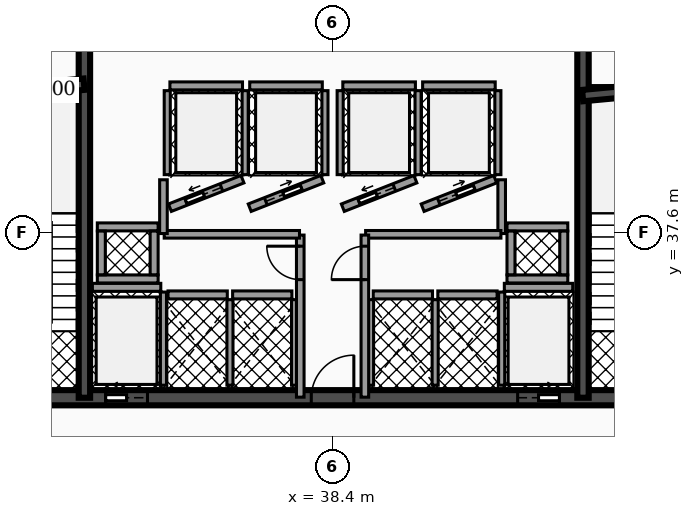
"""IFC4 building model, lengths in metres.
Left out: names, types, materials, properties, quantities, classifications, styles, units other than length and angle.
Written with IfcOpenShell. Run it as: python <this file> out.ifc"""

import sys

from ifc_helpers import new_model, si_unit, direction, frame, frame_2d, origin, place, context, subcontext, project, spatial, rectangle, extrude, element, fill, save


model = new_model("IFC4")
c1 = context("Model", 3, precision=1e-05, world=origin(), true_north=direction((0.0, 1.0)))
c2 = subcontext(c1, "Body", "Model", "MODEL_VIEW")
j1 = project(units=[si_unit("LENGTHUNIT", "METRE"), si_unit("PLANEANGLEUNIT", "RADIAN")], contexts=[c1])
p1 = place(None, origin())
s1 = spatial("IfcSite", under=j1, at=p1, CompositionType="ELEMENT")
p2 = place(p1, origin())
s2 = spatial("IfcBuilding", under=s1, at=p2, CompositionType="ELEMENT")
p3 = place(p2, frame((0.0, 0.0, 76.5)))
s3 = spatial("IfcBuildingStorey", under=s2, at=p3, CompositionType="ELEMENT", Elevation=76.5)
p4 = place(p3, frame((28.4, 33.25, 0.0), z_axis=(0.0, 0.0, 1.0), x_axis=(1.0, 0.0, 0.0)))
e1 = element("IfcWall", 1, at=p4, inside=s3, PredefinedType="SHEAR", context=c2, shape_type="SweptSolid", body=[
    extrude(rectangle(XDim=20.06, YDim=0.4, at=frame_2d((10.03, 0.0))), origin(), (0.0, 0.0, 1.0), 3.82),
])
p5 = place(p4, frame((4.03, 0.0, 0.0)))
e2 = element("IfcOpeningElement", 2, at=p5, cuts=e1, PredefinedType="OPENING", context=c2, shape_type="SweptSolid", body=[
    extrude(rectangle(XDim=1.1, YDim=2.15, at=frame_2d((0.55, 1.075))), frame((0.0, 0.21, 0.0), z_axis=(0.0, -1.0, 0.0), x_axis=(1.0, 0.0, 0.0)), (0.0, 0.0, 1.0), 0.42),
])
p6 = place(p4, frame((14.87, 0.0, 0.0)))
e3 = element("IfcOpeningElement", 3, at=p6, cuts=e1, PredefinedType="OPENING", context=c2, shape_type="SweptSolid", body=[
    extrude(rectangle(XDim=1.1, YDim=2.15, at=frame_2d((0.55, 1.075))), frame((0.0, 0.21, 0.0), z_axis=(0.0, -1.0, 0.0), x_axis=(1.0, 0.0, 0.0)), (0.0, 0.0, 1.0), 0.42),
])
p7 = place(p4, frame((1.31, 0.0, 0.0)))
e4 = element("IfcOpeningElement", 4, at=p7, cuts=e1, PredefinedType="OPENING", context=c2, shape_type="SweptSolid", body=[
    extrude(rectangle(XDim=1.1, YDim=2.2, at=frame_2d((0.55, 1.1))), frame((0.0, 0.21, 0.0), z_axis=(0.0, -1.0, 0.0), x_axis=(1.0, 0.0, 0.0)), (0.0, 0.0, 1.0), 0.42),
])
p8 = place(p4, frame((9.44, 0.0, 0.0)))
e5 = element("IfcOpeningElement", 5, at=p8, cuts=e1, PredefinedType="OPENING", context=c2, shape_type="SweptSolid", body=[
    extrude(rectangle(XDim=1.12, YDim=2.05, at=frame_2d((0.56, 1.025))), frame((0.0, 0.21, 0.0), z_axis=(0.0, -1.0, 0.0), x_axis=(1.0, 0.0, 0.0)), (0.0, 0.0, 1.0), 0.42),
])
p9 = place(p4, frame((17.65, 0.0, 0.0)))
e6 = element("IfcOpeningElement", 6, at=p9, cuts=e1, PredefinedType="OPENING", context=c2, shape_type="SweptSolid", body=[
    extrude(rectangle(XDim=1.1, YDim=2.2, at=frame_2d((0.55, 1.1))), frame((0.0, 0.21, 0.0), z_axis=(0.0, -1.0, 0.0), x_axis=(1.0, 0.0, 0.0)), (0.0, 0.0, 1.0), 0.42),
])
for number, where, z_axis, x_axis in (
    (7, (31.87, 33.25, 0.0), (0.0, 0.0, 1.0), (0.0, 1.0, 0.0)),
    (8, (44.99, 33.25, 0.0), (0.0, 0.0, 1.0), (0.0, 1.0, 0.0)),
):
    element("IfcWall", number, at=place(p3, frame(where, z_axis=z_axis, x_axis=x_axis)), inside=s3, PredefinedType="SHEAR", context=c2, shape_type="SweptSolid", body=[
        extrude(rectangle(XDim=10.2, YDim=0.3, at=frame_2d((5.1, 0.0))), origin(), (0.0, 0.0, 1.0), 3.82),
    ])
p10 = place(p3, frame((28.64, 41.2, 0.0), z_axis=(0.0, 0.0, 1.0), x_axis=(0.995687118776, 0.092774789157, 0.0)))
e9 = element("IfcWall", 9, at=p10, inside=s3, PredefinedType="SHEAR", context=c2, shape_type="SweptSolid", body=[
    extrude(rectangle(XDim=3.234, YDim=0.3, at=frame_2d((1.617, 0.0))), origin(), (0.0, 0.0, 1.0), 3.82),
])
p11 = place(p3, frame((44.98, 41.2, 0.0), z_axis=(0.0, 0.0, 1.0), x_axis=(0.995686468965, 0.09278176286, 0.0)))
e10 = element("IfcWall", 10, at=p11, inside=s3, PredefinedType="SHEAR", context=c2, shape_type="SweptSolid", body=[
    extrude(rectangle(XDim=3.234, YDim=0.3, at=frame_2d((1.617, 0.0))), origin(), (0.0, 0.0, 1.0), 3.82),
])
p12 = place(p3, frame((32.08, 36.155, 0.0), z_axis=(0.0, 0.0, 1.0), x_axis=(1.0, 0.0, 0.0)))
e11 = element("IfcWall", 11, at=p12, inside=s3, PredefinedType="SOLIDWALL", context=c2, shape_type="SweptSolid", body=[
    extrude(rectangle(XDim=1.8, YDim=0.21, at=frame_2d((0.9, 0.0))), origin(), (0.0, 0.0, 1.0), 2.792),
])
p13 = place(p3, frame((33.95, 33.58, 0.0), z_axis=(0.0, 0.0, 1.0), x_axis=(0.0, 1.0, 0.0)))
e12 = element("IfcWall", 12, at=p13, inside=s3, PredefinedType="SOLIDWALL", context=c2, shape_type="SweptSolid", body=[
    extrude(rectangle(XDim=2.45, YDim=0.16, at=frame_2d((1.225, 0.0))), origin(), (0.0, 0.0, 1.0), 2.792),
])
p14 = place(p3, frame((42.92, 36.155, 0.0), z_axis=(0.0, 0.0, 1.0), x_axis=(1.0, 0.0, 0.0)))
e13 = element("IfcWall", 13, at=p14, inside=s3, PredefinedType="SOLIDWALL", context=c2, shape_type="SweptSolid", body=[
    extrude(rectangle(XDim=1.8, YDim=0.21, at=frame_2d((0.9, 0.0))), origin(), (0.0, 0.0, 1.0), 2.792),
])
p15 = place(p3, frame((42.85, 33.58, 0.0), z_axis=(0.0, 0.0, 1.0), x_axis=(0.0, 1.0, 0.0)))
e14 = element("IfcWall", 14, at=p15, inside=s3, PredefinedType="SOLIDWALL", context=c2, shape_type="SweptSolid", body=[
    extrude(rectangle(XDim=2.45, YDim=0.16, at=frame_2d((1.225, 0.0))), origin(), (0.0, 0.0, 1.0), 2.792),
])
p16 = place(p3, frame((34.12, 38.25, 0.0), z_axis=(0.0, 0.0, 1.0), x_axis=(0.930804993012, 0.36551616241, 0.0)))
e15 = element("IfcWall", 15, at=p16, inside=s3, PredefinedType="SOLIDWALL", context=c2, shape_type="SweptSolid", body=[
    extrude(rectangle(XDim=2.052, YDim=0.21, at=frame_2d((1.026, 0.0))), origin(), (0.0, 0.0, 1.0), 2.792),
])
p17 = place(p16, frame((0.455, 0.0, 0.0)))
e16 = element("IfcOpeningElement", 16, at=p17, cuts=e15, PredefinedType="OPENING", context=c2, shape_type="SweptSolid", body=[
    extrude(rectangle(XDim=1.0, YDim=2.1, at=frame_2d((0.5, 1.05))), frame((0.0, 0.115, 0.0), z_axis=(0.0, -1.0, 0.0), x_axis=(1.0, 0.0, 0.0)), (0.0, 0.0, 1.0), 0.23),
])
p18 = place(p3, frame((34.12, 41.455, 0.0), z_axis=(0.0, 0.0, 1.0), x_axis=(1.0, 0.0, 0.0)))
e17 = element("IfcWall", 17, at=p18, inside=s3, PredefinedType="SOLIDWALL", context=c2, shape_type="SweptSolid", body=[
    extrude(rectangle(XDim=1.91, YDim=0.21, at=frame_2d((0.955, 0.0))), origin(), (0.0, 0.0, 1.0), 2.792),
])
for number, where, z_axis, x_axis in (
    (18, (34.05, 39.12, 0.0), (0.0, 0.0, 1.0), (0.0, 1.0, 0.0)),
    (19, (36.1, 39.12, 0.0), (0.0, 0.0, 1.0), (0.0, 1.0, 0.0)),
):
    element("IfcWall", number, at=place(p3, frame(where, z_axis=z_axis, x_axis=x_axis)), inside=s3, PredefinedType="SOLIDWALL", context=c2, shape_type="SweptSolid", body=[
        extrude(rectangle(XDim=2.21, YDim=0.16, at=frame_2d((1.105, 0.0))), origin(), (0.0, 0.0, 1.0), 2.792),
    ])
p19 = place(p3, frame((36.22, 38.25, 0.0), z_axis=(0.0, 0.0, 1.0), x_axis=(0.930804993012, 0.36551616241, 0.0)))
e20 = element("IfcWall", 20, at=p19, inside=s3, PredefinedType="SOLIDWALL", context=c2, shape_type="SweptSolid", body=[
    extrude(rectangle(XDim=2.052, YDim=0.21, at=frame_2d((1.026, 0.0))), origin(), (0.0, 0.0, 1.0), 2.792),
])
p20 = place(p19, frame((0.455, 0.0, 0.0)))
e21 = element("IfcOpeningElement", 21, at=p20, cuts=e20, PredefinedType="OPENING", context=c2, shape_type="SweptSolid", body=[
    extrude(rectangle(XDim=1.0, YDim=2.1, at=frame_2d((0.5, 1.05))), frame((0.0, 0.115, 0.0), z_axis=(0.0, -1.0, 0.0), x_axis=(1.0, 0.0, 0.0)), (0.0, 0.0, 1.0), 0.23),
])
p21 = place(p3, frame((36.22, 41.455, 0.0), z_axis=(0.0, 0.0, 1.0), x_axis=(1.0, 0.0, 0.0)))
e22 = element("IfcWall", 22, at=p21, inside=s3, PredefinedType="SOLIDWALL", context=c2, shape_type="SweptSolid", body=[
    extrude(rectangle(XDim=1.91, YDim=0.21, at=frame_2d((0.955, 0.0))), origin(), (0.0, 0.0, 1.0), 2.792),
])
p22 = place(p3, frame((38.2, 39.12, 0.0), z_axis=(0.0, 0.0, 1.0), x_axis=(0.0, 1.0, 0.0)))
e23 = element("IfcWall", 23, at=p22, inside=s3, PredefinedType="SOLIDWALL", context=c2, shape_type="SweptSolid", body=[
    extrude(rectangle(XDim=2.21, YDim=0.16, at=frame_2d((1.105, 0.0))), origin(), (0.0, 0.0, 1.0), 2.792),
])
p23 = place(p3, frame((38.67, 38.25, 0.0), z_axis=(0.0, 0.0, 1.0), x_axis=(0.930820886763, 0.3654756856, 0.0)))
e24 = element("IfcWall", 24, at=p23, inside=s3, PredefinedType="SOLIDWALL", context=c2, shape_type="SweptSolid", body=[
    extrude(rectangle(XDim=2.052, YDim=0.21, at=frame_2d((1.026, 0.0))), origin(), (0.0, 0.0, 1.0), 2.792),
])
p24 = place(p23, frame((0.455, 0.0, 0.0)))
e25 = element("IfcOpeningElement", 25, at=p24, cuts=e24, PredefinedType="OPENING", context=c2, shape_type="SweptSolid", body=[
    extrude(rectangle(XDim=1.0, YDim=2.1, at=frame_2d((0.5, 1.05))), frame((0.0, 0.115, 0.0), z_axis=(0.0, -1.0, 0.0), x_axis=(1.0, 0.0, 0.0)), (0.0, 0.0, 1.0), 0.23),
])
p25 = place(p3, frame((38.67, 41.455, 0.0), z_axis=(0.0, 0.0, 1.0), x_axis=(1.0, 0.0, 0.0)))
e26 = element("IfcWall", 26, at=p25, inside=s3, PredefinedType="SOLIDWALL", context=c2, shape_type="SweptSolid", body=[
    extrude(rectangle(XDim=1.91, YDim=0.21, at=frame_2d((0.955, 0.0))), origin(), (0.0, 0.0, 1.0), 2.792),
])
for number, where, z_axis, x_axis in (
    (27, (38.6, 39.12, 0.0), (0.0, 0.0, 1.0), (0.0, 1.0, 0.0)),
    (28, (40.65, 39.12, 0.0), (0.0, 0.0, 1.0), (0.0, 1.0, 0.0)),
):
    element("IfcWall", number, at=place(p3, frame(where, z_axis=z_axis, x_axis=x_axis)), inside=s3, PredefinedType="SOLIDWALL", context=c2, shape_type="SweptSolid", body=[
        extrude(rectangle(XDim=2.21, YDim=0.16, at=frame_2d((1.105, 0.0))), origin(), (0.0, 0.0, 1.0), 2.792),
    ])
p26 = place(p3, frame((40.77, 38.25, 0.0), z_axis=(0.0, 0.0, 1.0), x_axis=(0.930804993012, 0.36551616241, 0.0)))
e29 = element("IfcWall", 29, at=p26, inside=s3, PredefinedType="SOLIDWALL", context=c2, shape_type="SweptSolid", body=[
    extrude(rectangle(XDim=2.052, YDim=0.21, at=frame_2d((1.026, 0.0))), origin(), (0.0, 0.0, 1.0), 2.792),
])
p27 = place(p26, frame((0.455, 0.0, 0.0)))
e30 = element("IfcOpeningElement", 30, at=p27, cuts=e29, PredefinedType="OPENING", context=c2, shape_type="SweptSolid", body=[
    extrude(rectangle(XDim=1.0, YDim=2.1, at=frame_2d((0.5, 1.05))), frame((0.0, 0.115, 0.0), z_axis=(0.0, -1.0, 0.0), x_axis=(1.0, 0.0, 0.0)), (0.0, 0.0, 1.0), 0.23),
])
p28 = place(p3, frame((40.77, 41.455, 0.0), z_axis=(0.0, 0.0, 1.0), x_axis=(1.0, 0.0, 0.0)))
e31 = element("IfcWall", 31, at=p28, inside=s3, PredefinedType="SOLIDWALL", context=c2, shape_type="SweptSolid", body=[
    extrude(rectangle(XDim=1.91, YDim=0.21, at=frame_2d((0.955, 0.0))), origin(), (0.0, 0.0, 1.0), 2.792),
])
p29 = place(p3, frame((42.75, 39.12, 0.0), z_axis=(0.0, 0.0, 1.0), x_axis=(0.0, 1.0, 0.0)))
e32 = element("IfcWall", 32, at=p29, inside=s3, PredefinedType="SOLIDWALL", context=c2, shape_type="SweptSolid", body=[
    extrude(rectangle(XDim=2.21, YDim=0.16, at=frame_2d((1.105, 0.0))), origin(), (0.0, 0.0, 1.0), 2.792),
])
p30 = place(p3, frame((34.07, 35.955, 0.0), z_axis=(0.0, 0.0, 1.0), x_axis=(1.0, 0.0, 0.0)))
e33 = element("IfcWall", 33, at=p30, inside=s3, PredefinedType="SOLIDWALL", context=c2, shape_type="SweptSolid", body=[
    extrude(rectangle(XDim=1.56, YDim=0.21, at=frame_2d((0.78, 0.0))), origin(), (0.0, 0.0, 1.0), 2.792),
])
p31 = place(p3, frame((35.7, 33.58, 0.0), z_axis=(0.0, 0.0, 1.0), x_axis=(0.0, 1.0, 0.0)))
e34 = element("IfcWall", 34, at=p31, inside=s3, PredefinedType="SOLIDWALL", context=c2, shape_type="SweptSolid", body=[
    extrude(rectangle(XDim=2.25, YDim=0.16, at=frame_2d((1.125, 0.0))), origin(), (0.0, 0.0, 1.0), 2.792),
])
p32 = place(p3, frame((35.77, 35.955, 0.0), z_axis=(0.0, 0.0, 1.0), x_axis=(1.0, 0.0, 0.0)))
e35 = element("IfcWall", 35, at=p32, inside=s3, PredefinedType="SOLIDWALL", context=c2, shape_type="SweptSolid", body=[
    extrude(rectangle(XDim=1.56, YDim=0.21, at=frame_2d((0.78, 0.0))), origin(), (0.0, 0.0, 1.0), 2.792),
])
p33 = place(p3, frame((37.4, 33.58, 0.0), z_axis=(0.0, 0.0, 1.0), x_axis=(0.0, 1.0, 0.0)))
e36 = element("IfcWall", 36, at=p33, inside=s3, PredefinedType="SOLIDWALL", context=c2, shape_type="SweptSolid", body=[
    extrude(rectangle(XDim=2.25, YDim=0.16, at=frame_2d((1.125, 0.0))), origin(), (0.0, 0.0, 1.0), 2.792),
])
p34 = place(p3, frame((39.47, 35.955, 0.0), z_axis=(0.0, 0.0, 1.0), x_axis=(1.0, 0.0, 0.0)))
e37 = element("IfcWall", 37, at=p34, inside=s3, PredefinedType="SOLIDWALL", context=c2, shape_type="SweptSolid", body=[
    extrude(rectangle(XDim=1.56, YDim=0.21, at=frame_2d((0.78, 0.0))), origin(), (0.0, 0.0, 1.0), 2.792),
])
for number, where, z_axis, x_axis in (
    (38, (39.4, 33.58, 0.0), (0.0, 0.0, 1.0), (0.0, 1.0, 0.0)),
    (39, (41.1, 33.58, 0.0), (0.0, 0.0, 1.0), (0.0, 1.0, 0.0)),
):
    element("IfcWall", number, at=place(p3, frame(where, z_axis=z_axis, x_axis=x_axis)), inside=s3, PredefinedType="SOLIDWALL", context=c2, shape_type="SweptSolid", body=[
        extrude(rectangle(XDim=2.25, YDim=0.16, at=frame_2d((1.125, 0.0))), origin(), (0.0, 0.0, 1.0), 2.792),
    ])
p35 = place(p3, frame((41.17, 35.955, 0.0), z_axis=(0.0, 0.0, 1.0), x_axis=(1.0, 0.0, 0.0)))
e40 = element("IfcWall", 40, at=p35, inside=s3, PredefinedType="SOLIDWALL", context=c2, shape_type="SweptSolid", body=[
    extrude(rectangle(XDim=1.56, YDim=0.21, at=frame_2d((0.78, 0.0))), origin(), (0.0, 0.0, 1.0), 2.792),
])
for number, where, z_axis, x_axis in (
    (41, (32.21, 36.375, 0.0), (0.0, 0.0, 1.0), (1.0, 0.0, 0.0)),
    (42, (32.21, 37.745, 0.0), (0.0, 0.0, 1.0), (1.0, 0.0, 0.0)),
):
    element("IfcWall", number, at=place(p3, frame(where, z_axis=z_axis, x_axis=x_axis)), inside=s3, PredefinedType="SOLIDWALL", context=c2, shape_type="SweptSolid", body=[
        extrude(rectangle(XDim=1.6, YDim=0.21, at=frame_2d((0.8, 0.0))), origin(), (0.0, 0.0, 1.0), 3.82),
    ])
for number, where, z_axis, x_axis in (
    (43, (32.315, 36.485, 0.0), (0.0, 0.0, 1.0), (0.0, 1.0, 0.0)),
    (44, (33.705, 36.485, 0.0), (0.0, 0.0, 1.0), (0.0, 1.0, 0.0)),
):
    element("IfcWall", number, at=place(p3, frame(where, z_axis=z_axis, x_axis=x_axis)), inside=s3, PredefinedType="SOLIDWALL", context=c2, shape_type="SweptSolid", body=[
        extrude(rectangle(XDim=1.15, YDim=0.21, at=frame_2d((0.575, 0.0))), origin(), (0.0, 0.0, 1.0), 3.82),
    ])
for number, where, z_axis, x_axis in (
    (45, (42.99, 36.375, 0.0), (0.0, 0.0, 1.0), (1.0, 0.0, 0.0)),
    (46, (42.99, 37.745, 0.0), (0.0, 0.0, 1.0), (1.0, 0.0, 0.0)),
):
    element("IfcWall", number, at=place(p3, frame(where, z_axis=z_axis, x_axis=x_axis)), inside=s3, PredefinedType="SOLIDWALL", context=c2, shape_type="SweptSolid", body=[
        extrude(rectangle(XDim=1.6, YDim=0.21, at=frame_2d((0.8, 0.0))), origin(), (0.0, 0.0, 1.0), 3.82),
    ])
for number, where, z_axis, x_axis in (
    (47, (43.095, 36.485, 0.0), (0.0, 0.0, 1.0), (0.0, 1.0, 0.0)),
    (48, (44.485, 36.485, 0.0), (0.0, 0.0, 1.0), (0.0, 1.0, 0.0)),
):
    element("IfcWall", number, at=place(p3, frame(where, z_axis=z_axis, x_axis=x_axis)), inside=s3, PredefinedType="SOLIDWALL", context=c2, shape_type="SweptSolid", body=[
        extrude(rectangle(XDim=1.15, YDim=0.21, at=frame_2d((0.575, 0.0))), origin(), (0.0, 0.0, 1.0), 3.82),
    ])
p36 = place(p3, frame((37.55, 33.265, 0.0), z_axis=(0.0, 0.0, 1.0), x_axis=(0.0, 1.0, 0.0)))
e49 = element("IfcWall", 49, at=p36, inside=s3, PredefinedType="PARTITIONING", context=c2, shape_type="SweptSolid", body=[
    extrude(rectangle(XDim=4.265, YDim=0.2, at=frame_2d((2.133, 0.0))), origin(), (0.0, 0.0, 1.0), 2.777),
])
p37 = place(p36, frame((3.093, 0.0, 0.0)))
e50 = element("IfcOpeningElement", 50, at=p37, cuts=e49, PredefinedType="OPENING", context=c2, shape_type="SweptSolid", body=[
    extrude(rectangle(XDim=0.88, YDim=2.05, at=frame_2d((0.44, 1.025))), frame((0.0, 0.11, 0.0), z_axis=(0.0, -1.0, 0.0), x_axis=(1.0, 0.0, 0.0)), (0.0, 0.0, 1.0), 0.22),
])
p38 = place(p3, frame((33.97, 37.55, 0.0), z_axis=(0.0, 0.0, 1.0), x_axis=(1.0, 0.0, 0.0)))
e51 = element("IfcWall", 51, at=p38, inside=s3, PredefinedType="PARTITIONING", context=c2, shape_type="SweptSolid", body=[
    extrude(rectangle(XDim=3.56, YDim=0.2, at=frame_2d((1.78, 0.0))), origin(), (0.0, 0.0, 1.0), 2.777),
])
for number, where, z_axis, x_axis in (
    (52, (33.95, 37.57, 0.0), (0.0, 0.0, 1.0), (0.0, 1.0, 0.0)),
    (53, (42.85, 37.57, 0.0), (0.0, 0.0, 1.0), (0.0, 1.0, 0.0)),
):
    element("IfcWall", number, at=place(p3, frame(where, z_axis=z_axis, x_axis=x_axis)), inside=s3, PredefinedType="PARTITIONING", context=c2, shape_type="SweptSolid", body=[
        extrude(rectangle(XDim=1.415, YDim=0.2, at=frame_2d((0.708, 0.0))), origin(), (0.0, 0.0, 1.0), 2.777),
    ])
p39 = place(p3, frame((39.27, 37.55, 0.0), z_axis=(0.0, 0.0, 1.0), x_axis=(1.0, 0.0, 0.0)))
e54 = element("IfcWall", 54, at=p39, inside=s3, PredefinedType="PARTITIONING", context=c2, shape_type="SweptSolid", body=[
    extrude(rectangle(XDim=3.56, YDim=0.2, at=frame_2d((1.78, 0.0))), origin(), (0.0, 0.0, 1.0), 2.777),
])
p40 = place(p3, frame((39.25, 33.265, 0.0), z_axis=(0.0, 0.0, 1.0), x_axis=(0.0, 1.0, 0.0)))
e55 = element("IfcWall", 55, at=p40, inside=s3, PredefinedType="PARTITIONING", context=c2, shape_type="SweptSolid", body=[
    extrude(rectangle(XDim=4.265, YDim=0.2, at=frame_2d((2.133, 0.0))), origin(), (0.0, 0.0, 1.0), 2.777),
])
p41 = place(p40, frame((3.093, 0.0, 0.0)))
e56 = element("IfcOpeningElement", 56, at=p41, cuts=e55, PredefinedType="OPENING", context=c2, shape_type="SweptSolid", body=[
    extrude(rectangle(XDim=0.88, YDim=2.05, at=frame_2d((0.44, 1.025))), frame((0.0, 0.11, 0.0), z_axis=(0.0, -1.0, 0.0), x_axis=(1.0, 0.0, 0.0)), (0.0, 0.0, 1.0), 0.22),
])
p42 = place(p5, origin())
e57 = element("IfcDoor", 57, at=p42, inside=s3, OperationType="SLIDING_TO_LEFT", PredefinedType="DOOR", context=c2, shape_type="SweptSolid", body=[
    extrude(rectangle(XDim=1.1, YDim=2.15, at=frame_2d((0.55, 1.075))), frame((0.0, 0.025, 0.0), z_axis=(0.0, -1.0, 0.0), x_axis=(1.0, 0.0, 0.0)), (0.0, 0.0, 1.0), 0.05),
])
fill(e2, e57)
p43 = place(p6, origin())
e58 = element("IfcDoor", 58, at=p43, inside=s3, OperationType="SLIDING_TO_RIGHT", PredefinedType="DOOR", context=c2, shape_type="SweptSolid", body=[
    extrude(rectangle(XDim=1.1, YDim=2.15, at=frame_2d((0.55, 1.075))), frame((0.0, 0.025, 0.0), z_axis=(0.0, -1.0, 0.0), x_axis=(1.0, 0.0, 0.0)), (0.0, 0.0, 1.0), 0.05),
])
fill(e3, e58)
p44 = place(p17, origin())
e59 = element("IfcDoor", 59, at=p44, inside=s3, OperationType="SLIDING_TO_LEFT", PredefinedType="DOOR", context=c2, shape_type="SweptSolid", body=[
    extrude(rectangle(XDim=1.0, YDim=2.1, at=frame_2d((0.5, 1.05))), frame((0.0, 0.025, 0.0), z_axis=(0.0, -1.0, 0.0), x_axis=(1.0, 0.0, 0.0)), (0.0, 0.0, 1.0), 0.05),
])
fill(e16, e59)
p45 = place(p20, origin())
e60 = element("IfcDoor", 60, at=p45, inside=s3, OperationType="SLIDING_TO_RIGHT", PredefinedType="DOOR", context=c2, shape_type="SweptSolid", body=[
    extrude(rectangle(XDim=1.0, YDim=2.1, at=frame_2d((0.5, 1.05))), frame((0.0, 0.025, 0.0), z_axis=(0.0, -1.0, 0.0), x_axis=(1.0, 0.0, 0.0)), (0.0, 0.0, 1.0), 0.05),
])
fill(e21, e60)
p46 = place(p24, origin())
e61 = element("IfcDoor", 61, at=p46, inside=s3, OperationType="SLIDING_TO_LEFT", PredefinedType="DOOR", context=c2, shape_type="SweptSolid", body=[
    extrude(rectangle(XDim=1.0, YDim=2.1, at=frame_2d((0.5, 1.05))), frame((0.0, 0.025, 0.0), z_axis=(0.0, -1.0, 0.0), x_axis=(1.0, 0.0, 0.0)), (0.0, 0.0, 1.0), 0.05),
])
fill(e25, e61)
p47 = place(p27, origin())
e62 = element("IfcDoor", 62, at=p47, inside=s3, OperationType="SLIDING_TO_RIGHT", PredefinedType="DOOR", context=c2, shape_type="SweptSolid", body=[
    extrude(rectangle(XDim=1.0, YDim=2.1, at=frame_2d((0.5, 1.05))), frame((0.0, 0.025, 0.0), z_axis=(0.0, -1.0, 0.0), x_axis=(1.0, 0.0, 0.0)), (0.0, 0.0, 1.0), 0.05),
])
fill(e30, e62)
p48 = place(p8, origin())
e63 = element("IfcDoor", 63, at=p48, inside=s3, OperationType="SINGLE_SWING_RIGHT", PredefinedType="DOOR", context=c2, shape_type="SweptSolid", body=[
    extrude(rectangle(XDim=1.12, YDim=2.05, at=frame_2d((0.56, 1.025))), frame((0.0, 0.025, 0.0), z_axis=(0.0, -1.0, 0.0), x_axis=(1.0, 0.0, 0.0)), (0.0, 0.0, 1.0), 0.05),
])
fill(e5, e63)
p49 = place(p37, origin())
e64 = element("IfcDoor", 64, at=p49, inside=s3, OperationType="SINGLE_SWING_RIGHT", PredefinedType="DOOR", context=c2, shape_type="SweptSolid", body=[
    extrude(rectangle(XDim=0.88, YDim=2.05, at=frame_2d((0.44, 1.025))), frame((0.0, 0.025, 0.0), z_axis=(0.0, -1.0, 0.0), x_axis=(1.0, 0.0, 0.0)), (0.0, 0.0, 1.0), 0.05),
])
fill(e50, e64)
p50 = place(p41, origin())
e65 = element("IfcDoor", 65, at=p50, inside=s3, OperationType="SINGLE_SWING_LEFT", PredefinedType="DOOR", context=c2, shape_type="SweptSolid", body=[
    extrude(rectangle(XDim=0.88, YDim=2.05, at=frame_2d((0.44, 1.025))), frame((0.0, 0.025, 0.0), z_axis=(0.0, -1.0, 0.0), x_axis=(1.0, 0.0, 0.0)), (0.0, 0.0, 1.0), 0.05),
])
fill(e56, e65)
save(model, sys.argv[1])
